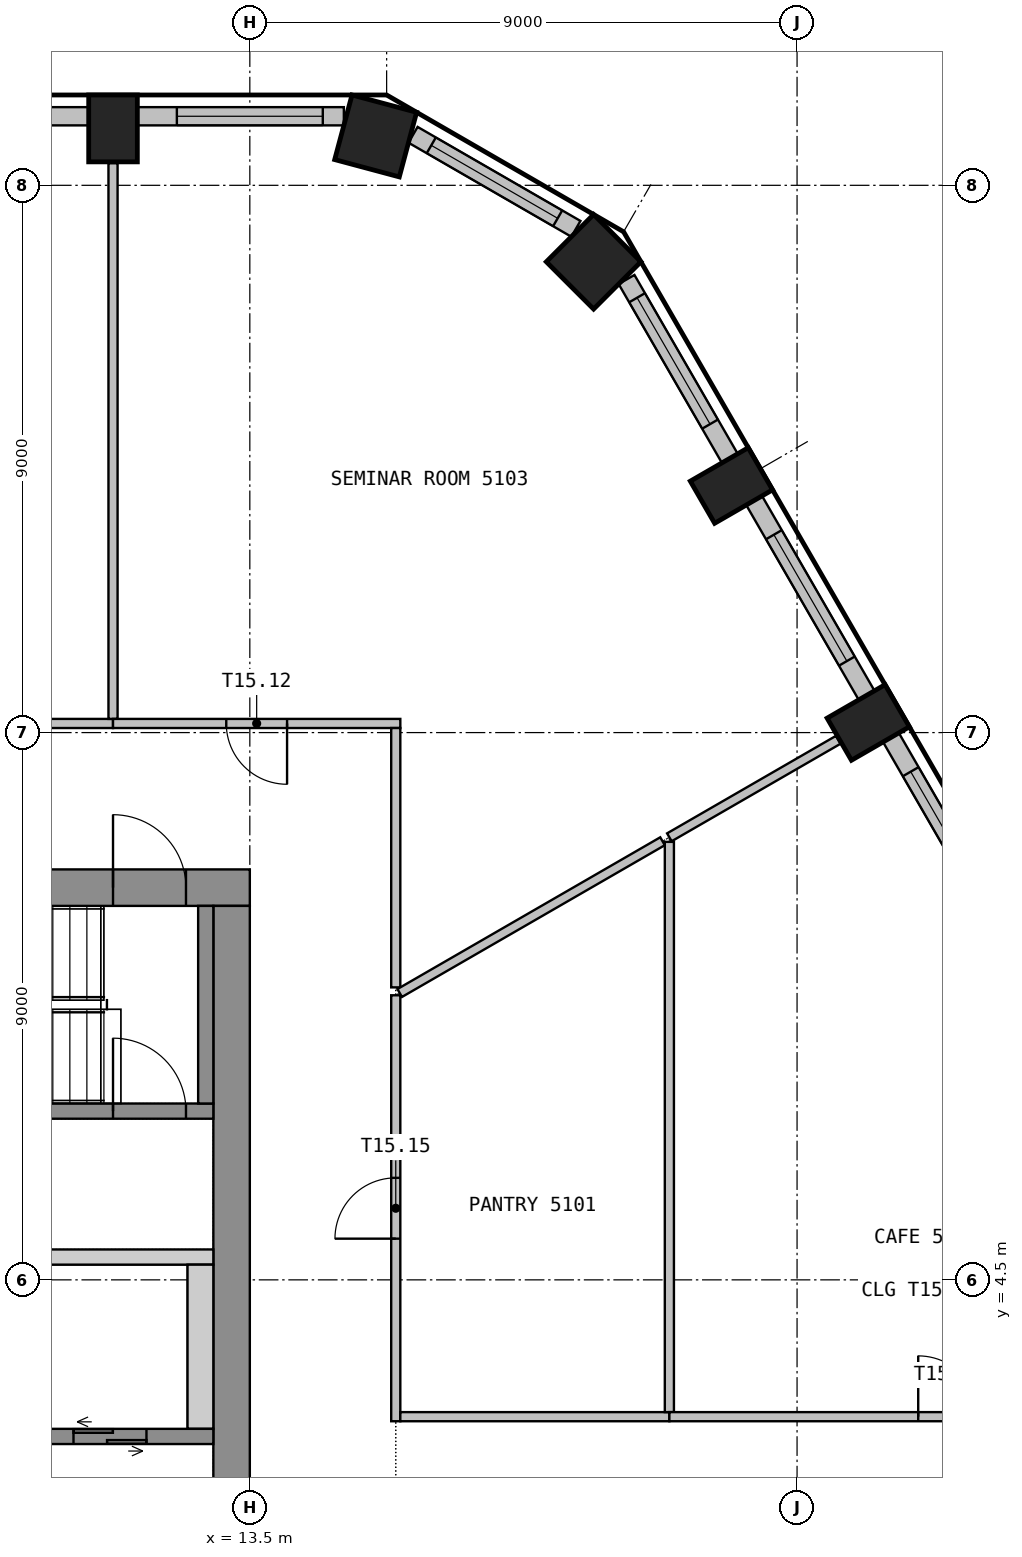
"""IFC4 building model, lengths in metres.
Left out: names, types, materials, properties, quantities, classifications, styles, units other than length and angle.
Written with IfcOpenShell. Run it as: python <this file> out.ifc"""

import sys

from ifc_helpers import new_model, si_unit, direction, frame, frame_2d, origin, origin_2d, place, context, subcontext, project, spatial, polyline, rectangle, outline, extrude, element, fill, save


model = new_model("IFC4")
c1 = context("Model", 3, precision=1e-05, world=origin(), true_north=direction((0.0, 1.0)))
c2 = subcontext(c1, "Body", "Model", "MODEL_VIEW")
j1 = project(units=[si_unit("LENGTHUNIT", "METRE"), si_unit("PLANEANGLEUNIT", "RADIAN")], contexts=[c1])
p1 = place(None, origin())
s1 = spatial("IfcSite", under=j1, at=p1, CompositionType="ELEMENT")
p2 = place(p1, origin())
s2 = spatial("IfcBuilding", under=s1, at=p2, CompositionType="ELEMENT")
p3 = place(p2, frame((0.0, 0.0, 207.3)))
s3 = spatial("IfcBuildingStorey", under=s2, at=p3, CompositionType="ELEMENT", Elevation=207.3)
for number, where, z_axis, x_axis in (
    (1, (23.671, 13.666, 0.0), (0.0, 0.0, 1.0), (-0.5, 0.866, 0.0)),
    (2, (21.421, 17.563, 0.0), (0.0, 0.0, 1.0), (-0.5, 0.866, 0.0)),
):
    element("IfcColumn", number, at=place(p3, frame(where, z_axis=z_axis, x_axis=x_axis)), inside=s3, PredefinedType="COLUMN", context=c2, shape_type="SweptSolid", body=[
        extrude(rectangle(XDim=0.8, YDim=1.1, at=origin_2d()), origin(), (0.0, 0.0, 1.0), 3.55),
    ])
for number, where, z_axis, x_axis in (
    (3, (19.154, 21.242, 0.0), (0.0, 0.0, 1.0), (-0.707, 0.707, 0.0)),
    (4, (15.57, 23.312, 0.0), (0.0, 0.0, 1.0), (-0.966, 0.259, 0.0)),
):
    element("IfcColumn", number, at=place(p3, frame(where, z_axis=z_axis, x_axis=x_axis)), inside=s3, PredefinedType="COLUMN", context=c2, shape_type="SweptSolid", body=[
        extrude(rectangle(XDim=1.1, YDim=1.1, at=origin_2d()), origin(), (0.0, 0.0, 1.0), 3.55),
    ])
p4 = place(p3, frame((11.25, 23.436, 0.0), z_axis=(0.0, 0.0, 1.0), x_axis=(-1.0, 0.0, 0.0)))
e5 = element("IfcColumn", 5, at=p4, inside=s3, PredefinedType="COLUMN", context=c2, shape_type="SweptSolid", body=[
    extrude(rectangle(XDim=0.8, YDim=1.1, at=origin_2d()), origin(), (0.0, 0.0, 1.0), 3.55),
])
p5 = place(p3, frame((25.894, 10.216, 0.0), z_axis=(0.0, 0.0, 1.0), x_axis=(-0.500029062817, 0.866008623709, 0.0)))
e6 = element("IfcWall", 6, at=p5, inside=s3, PredefinedType="SOLIDWALL", context=c2, shape_type="SweptSolid", body=[
    extrude(rectangle(XDim=3.699, YDim=0.3, at=frame_2d((1.85, 0.0))), origin(), (0.0, 0.0, 1.0), 3.55),
])
p6 = place(p5, frame((0.649, 0.0, 0.9)))
e7 = element("IfcOpeningElement", 7, at=p6, cuts=e6, PredefinedType="OPENING", context=c2, shape_type="SweptSolid", body=[
    extrude(rectangle(XDim=2.4, YDim=2.1, at=frame_2d((1.2, 1.05))), frame((0.0, 0.16, 0.0), z_axis=(0.0, -1.0, 0.0), x_axis=(1.0, 0.0, 0.0)), (0.0, 0.0, 1.0), 0.32),
])
p7 = place(p3, frame((23.644, 14.113, 0.0), z_axis=(0.0, 0.0, 1.0), x_axis=(-0.500029062817, 0.866008623709, 0.0)))
e8 = element("IfcWall", 8, at=p7, inside=s3, PredefinedType="SOLIDWALL", context=c2, shape_type="SweptSolid", body=[
    extrude(rectangle(XDim=3.699, YDim=0.3, at=frame_2d((1.85, 0.0))), origin(), (0.0, 0.0, 1.0), 3.55),
])
p8 = place(p7, frame((0.649, 0.0, 0.9)))
e9 = element("IfcOpeningElement", 9, at=p8, cuts=e8, PredefinedType="OPENING", context=c2, shape_type="SweptSolid", body=[
    extrude(rectangle(XDim=2.4, YDim=2.1, at=frame_2d((1.2, 1.05))), frame((0.0, 0.16, 0.0), z_axis=(0.0, -1.0, 0.0), x_axis=(1.0, 0.0, 0.0)), (0.0, 0.0, 1.0), 0.32),
])
p9 = place(p3, frame((21.394, 18.01, 0.0), z_axis=(0.0, 0.0, 1.0), x_axis=(-0.500012868213, 0.866017974191, 0.0)))
e10 = element("IfcWall", 10, at=p9, inside=s3, PredefinedType="SOLIDWALL", context=c2, shape_type="SweptSolid", body=[
    extrude(rectangle(XDim=3.396, YDim=0.3, at=frame_2d((1.698, 0.0))), origin(), (0.0, 0.0, 1.0), 3.55),
])
p10 = place(p9, frame((0.649, 0.0, 0.9)))
e11 = element("IfcOpeningElement", 11, at=p10, cuts=e10, PredefinedType="OPENING", context=c2, shape_type="SweptSolid", body=[
    extrude(rectangle(XDim=2.4, YDim=2.1, at=frame_2d((1.2, 1.05))), frame((0.0, 0.16, 0.0), z_axis=(0.0, -1.0, 0.0), x_axis=(1.0, 0.0, 0.0)), (0.0, 0.0, 1.0), 0.32),
])
p11 = place(p3, frame((18.863, 21.784, 0.0), z_axis=(0.0, 0.0, 1.0), x_axis=(-0.865994975416, 0.500052699777, 0.0)))
e12 = element("IfcWall", 12, at=p11, inside=s3, PredefinedType="SOLIDWALL", context=c2, shape_type="SweptSolid", body=[
    extrude(rectangle(XDim=3.093, YDim=0.3, at=frame_2d((1.546, 0.0))), origin(), (0.0, 0.0, 1.0), 3.55),
])
p12 = place(p11, frame((0.346, 0.0, 0.9)))
e13 = element("IfcOpeningElement", 13, at=p12, cuts=e12, PredefinedType="OPENING", context=c2, shape_type="SweptSolid", body=[
    extrude(rectangle(XDim=2.4, YDim=2.1, at=frame_2d((1.2, 1.05))), frame((0.0, 0.16, 0.0), z_axis=(0.0, -1.0, 0.0), x_axis=(1.0, 0.0, 0.0)), (0.0, 0.0, 1.0), 0.32),
])
p13 = place(p3, frame((15.046, 23.635, 0.0), z_axis=(0.0, 0.0, 1.0), x_axis=(-1.0, 0.0, 0.0)))
e14 = element("IfcWall", 14, at=p13, inside=s3, PredefinedType="SOLIDWALL", context=c2, shape_type="SweptSolid", body=[
    extrude(rectangle(XDim=3.396, YDim=0.3, at=frame_2d((1.698, 0.0))), origin(), (0.0, 0.0, 1.0), 3.55),
])
p14 = place(p13, frame((0.346, 0.0, 0.9)))
e15 = element("IfcOpeningElement", 15, at=p14, cuts=e14, PredefinedType="OPENING", context=c2, shape_type="SweptSolid", body=[
    extrude(rectangle(XDim=2.4, YDim=2.1, at=frame_2d((1.2, 1.05))), frame((0.0, 0.16, 0.0), z_axis=(0.0, -1.0, 0.0), x_axis=(1.0, 0.0, 0.0)), (0.0, 0.0, 1.0), 0.32),
])
p15 = place(p3, frame((10.85, 23.635, 0.0), z_axis=(0.0, 0.0, 1.0), x_axis=(-1.0, 0.0, 0.0)))
e16 = element("IfcWall", 16, at=p15, inside=s3, PredefinedType="SOLIDWALL", context=c2, shape_type="SweptSolid", body=[
    extrude(rectangle(XDim=3.699, YDim=0.3, at=frame_2d((1.85, 0.0))), origin(), (0.0, 0.0, 1.0), 3.55),
])
p16 = place(p15, frame((0.649, 0.0, 0.9)))
e17 = element("IfcOpeningElement", 17, at=p16, cuts=e16, PredefinedType="OPENING", context=c2, shape_type="SweptSolid", body=[
    extrude(rectangle(XDim=2.4, YDim=2.1, at=frame_2d((1.2, 1.05))), frame((0.0, 0.16, 0.0), z_axis=(0.0, -1.0, 0.0), x_axis=(1.0, 0.0, 0.0)), (0.0, 0.0, 1.0), 0.32),
])
p17 = place(p3, frame((-13.5, 10.95, 0.0), z_axis=(0.0, 0.0, 1.0), x_axis=(1.0, 0.0, 0.0)))
e18 = element("IfcWall", 18, at=p17, inside=s3, PredefinedType="SHEAR", context=c2, shape_type="SweptSolid", body=[
    extrude(rectangle(XDim=27.0, YDim=0.6, at=frame_2d((13.5, 0.0))), origin(), (0.0, 0.0, 1.0), 3.55),
])
p18 = place(p17, frame((12.3, 0.0, 0.0)))
e19 = element("IfcOpeningElement", 19, at=p18, cuts=e18, PredefinedType="OPENING", context=c2, shape_type="SweptSolid", body=[
    extrude(rectangle(XDim=2.4, YDim=2.1, at=frame_2d((1.2, 1.05))), frame((0.0, 0.31, 0.0), z_axis=(0.0, -1.0, 0.0), x_axis=(1.0, 0.0, 0.0)), (0.0, 0.0, 1.0), 0.62),
])
p19 = place(p17, frame((1.05, 0.0, 0.0)))
e20 = element("IfcOpeningElement", 20, at=p19, cuts=e18, PredefinedType="OPENING", context=c2, shape_type="SweptSolid", body=[
    extrude(rectangle(XDim=1.2, YDim=2.1, at=frame_2d((0.6, 1.05))), frame((0.0, 0.31, 0.0), z_axis=(0.0, -1.0, 0.0), x_axis=(1.0, 0.0, 0.0)), (0.0, 0.0, 1.0), 0.62),
])
p20 = place(p17, frame((24.75, 0.0, 0.0)))
e21 = element("IfcOpeningElement", 21, at=p20, cuts=e18, PredefinedType="OPENING", context=c2, shape_type="SweptSolid", body=[
    extrude(rectangle(XDim=1.2, YDim=2.1, at=frame_2d((0.6, 1.05))), frame((0.0, 0.31, 0.0), z_axis=(0.0, -1.0, 0.0), x_axis=(1.0, 0.0, 0.0)), (0.0, 0.0, 1.0), 0.62),
])
p21 = place(p3, frame((13.2, -10.65, 0.0), z_axis=(0.0, 0.0, 1.0), x_axis=(0.0, 1.0, 0.0)))
e22 = element("IfcWall", 22, at=p21, inside=s3, PredefinedType="SHEAR", context=c2, shape_type="SweptSolid", body=[
    extrude(rectangle(XDim=21.3, YDim=0.6, at=frame_2d((10.65, 0.0))), origin(), (0.0, 0.0, 1.0), 3.55),
])
p22 = place(p21, frame((9.45, 0.0, 0.0)))
e23 = element("IfcOpeningElement", 23, at=p22, cuts=e22, PredefinedType="OPENING", context=c2, shape_type="SweptSolid", body=[
    extrude(rectangle(XDim=2.4, YDim=2.1, at=frame_2d((1.2, 1.05))), frame((0.0, 0.31, 0.0), z_axis=(0.0, -1.0, 0.0), x_axis=(1.0, 0.0, 0.0)), (0.0, 0.0, 1.0), 0.62),
])
p23 = place(p3, origin())
e24 = element("IfcWall", 24, at=p23, inside=s3, PredefinedType="SHEAR", context=c2, shape_type="SweptSolid", body=[
    extrude(outline(polyline([(4.075, 4.75), (12.9, 4.75), (12.9, 5.0), (4.075, 5.0), (4.075, 4.75)])), origin(), (0.0, 0.0, 1.0), 3.55),
])
p24 = place(p3, origin())
e25 = element("IfcWall", 25, at=p24, inside=s3, PredefinedType="SHEAR", context=c2, shape_type="SweptSolid", body=[
    extrude(outline(polyline([(12.475, 2.05), (12.9, 2.05), (12.9, 4.75), (12.475, 4.75), (12.475, 2.05)])), origin(), (0.0, 0.0, 1.0), 3.55),
])
p25 = place(p3, frame((9.675, 1.925, 0.0), z_axis=(0.0, 0.0, 1.0), x_axis=(1.0, 0.0, 0.0)))
e26 = element("IfcWall", 26, at=p25, inside=s3, PredefinedType="SHEAR", context=c2, shape_type="SweptSolid", body=[
    extrude(rectangle(XDim=3.225, YDim=0.25, at=frame_2d((1.612, 0.0))), origin(), (0.0, 0.0, 1.0), 3.55),
])
p26 = place(p25, frame((0.925, 0.0, 0.0)))
e27 = element("IfcOpeningElement", 27, at=p26, cuts=e26, PredefinedType="OPENING", context=c2, shape_type="SweptSolid", body=[
    extrude(rectangle(XDim=1.2, YDim=2.1, at=frame_2d((0.6, 1.05))), frame((0.0, 0.135, 0.0), z_axis=(0.0, -1.0, 0.0), x_axis=(1.0, 0.0, 0.0)), (0.0, 0.0, 1.0), 0.27),
])
p27 = place(p3, frame((2.8, 7.275, 0.0), z_axis=(0.0, 0.0, 1.0), x_axis=(1.0, 0.0, 0.0)))
e28 = element("IfcWall", 28, at=p27, inside=s3, PredefinedType="SHEAR", context=c2, shape_type="SweptSolid", body=[
    extrude(rectangle(XDim=10.1, YDim=0.25, at=frame_2d((5.05, 0.0))), origin(), (0.0, 0.0, 1.0), 3.55),
])
p28 = place(p27, frame((8.45, 0.0, 0.0)))
e29 = element("IfcOpeningElement", 29, at=p28, cuts=e28, PredefinedType="OPENING", context=c2, shape_type="SweptSolid", body=[
    extrude(rectangle(XDim=1.2, YDim=2.1, at=frame_2d((0.6, 1.05))), frame((0.0, 0.135, 0.0), z_axis=(0.0, -1.0, 0.0), x_axis=(1.0, 0.0, 0.0)), (0.0, 0.0, 1.0), 0.27),
])
p29 = place(p3, frame((12.775, 7.4, 0.0), z_axis=(0.0, 0.0, 1.0), x_axis=(0.0, 1.0, 0.0)))
e30 = element("IfcWall", 30, at=p29, inside=s3, PredefinedType="SHEAR", context=c2, shape_type="SweptSolid", body=[
    extrude(rectangle(XDim=3.25, YDim=0.25, at=frame_2d((1.625, 0.0))), origin(), (0.0, 0.0, 1.0), 3.55),
])
p30 = place(p3, frame((11.25, 13.65, 0.0), z_axis=(0.0, 0.0, 1.0), x_axis=(-1.0, 0.0, 0.0)))
e31 = element("IfcWall", 31, at=p30, inside=s3, PredefinedType="PARTITIONING", context=c2, shape_type="SweptSolid", body=[
    extrude(rectangle(XDim=13.5, YDim=0.15, at=frame_2d((6.75, 0.0))), origin(), (0.0, 0.0, 1.0), 3.55),
])
p31 = place(p30, frame((6.25, 0.0, 0.0)))
e32 = element("IfcOpeningElement", 32, at=p31, cuts=e31, PredefinedType="OPENING", context=c2, shape_type="SweptSolid", body=[
    extrude(rectangle(XDim=1.0, YDim=2.1, at=frame_2d((0.5, 1.05))), frame((0.0, 0.085, 0.0), z_axis=(0.0, -1.0, 0.0), x_axis=(1.0, 0.0, 0.0)), (0.0, 0.0, 1.0), 0.17),
])
p32 = place(p3, frame((11.25, 22.865, 0.0), z_axis=(0.0, 0.0, 1.0), x_axis=(0.0, -1.0, 0.0)))
e33 = element("IfcWall", 33, at=p32, inside=s3, PredefinedType="PARTITIONING", context=c2, shape_type="SweptSolid", body=[
    extrude(rectangle(XDim=9.14, YDim=0.15, at=frame_2d((4.57, 0.0))), origin(), (0.0, 0.0, 1.0), 3.55),
])
p33 = place(p3, frame((15.975, 13.65, 0.0), z_axis=(0.0, 0.0, 1.0), x_axis=(-1.0, 0.0, 0.0)))
e34 = element("IfcWall", 34, at=p33, inside=s3, PredefinedType="PARTITIONING", context=c2, shape_type="SweptSolid", body=[
    extrude(rectangle(XDim=4.725, YDim=0.15, at=frame_2d((2.363, 0.0))), origin(), (0.0, 0.0, 1.0), 3.55),
])
p34 = place(p33, frame((1.863, 0.0, 0.0)))
e35 = element("IfcOpeningElement", 35, at=p34, cuts=e34, PredefinedType="OPENING", context=c2, shape_type="SweptSolid", body=[
    extrude(rectangle(XDim=1.0, YDim=2.1, at=frame_2d((0.5, 1.05))), frame((0.0, 0.085, 0.0), z_axis=(0.0, -1.0, 0.0), x_axis=(1.0, 0.0, 0.0)), (0.0, 0.0, 1.0), 0.17),
])
p35 = place(p3, frame((15.9, 2.175, 0.0), z_axis=(0.0, 0.0, 1.0), x_axis=(0.0, 1.0, 0.0)))
e36 = element("IfcWall", 36, at=p35, inside=s3, PredefinedType="PARTITIONING", context=c2, shape_type="SweptSolid", body=[
    extrude(rectangle(XDim=7.005, YDim=0.15, at=frame_2d((3.502, 0.0))), origin(), (0.0, 0.0, 1.0), 3.55),
])
p36 = place(p35, frame((3.002, 0.0, 0.0)))
e37 = element("IfcOpeningElement", 37, at=p36, cuts=e36, PredefinedType="OPENING", context=c2, shape_type="SweptSolid", body=[
    extrude(rectangle(XDim=1.0, YDim=2.1, at=frame_2d((0.5, 1.05))), frame((0.0, 0.085, 0.0), z_axis=(0.0, -1.0, 0.0), x_axis=(1.0, 0.0, 0.0)), (0.0, 0.0, 1.0), 0.17),
])
p37 = place(p3, frame((15.975, 2.25, 0.0), z_axis=(0.0, 0.0, 1.0), x_axis=(1.0, 0.0, 0.0)))
e38 = element("IfcWall", 38, at=p37, inside=s3, PredefinedType="PARTITIONING", context=c2, shape_type="SweptSolid", body=[
    extrude(rectangle(XDim=4.425, YDim=0.15, at=frame_2d((2.212, 0.0))), origin(), (0.0, 0.0, 1.0), 3.55),
])
p38 = place(p3, frame((15.9, 9.31, 0.0), z_axis=(0.0, 0.0, 1.0), x_axis=(0.0, 1.0, 0.0)))
e39 = element("IfcWall", 39, at=p38, inside=s3, PredefinedType="PARTITIONING", context=c2, shape_type="SweptSolid", body=[
    extrude(rectangle(XDim=4.265, YDim=0.15, at=frame_2d((2.132, 0.0))), origin(), (0.0, 0.0, 1.0), 3.55),
])
p39 = place(p3, frame((20.287, 11.713, 0.0), z_axis=(0.0, 0.0, 1.0), x_axis=(-0.866034070548, -0.499984988425, 0.0)))
e40 = element("IfcWall", 40, at=p39, inside=s3, PredefinedType="PARTITIONING", context=c2, shape_type="SweptSolid", body=[
    extrude(rectangle(XDim=4.991, YDim=0.15, at=frame_2d((2.496, 0.0))), origin(), (0.0, 0.0, 1.0), 3.55),
])
p40 = place(p3, frame((20.4, 11.703, 0.0), z_axis=(0.0, 0.0, 1.0), x_axis=(0.0, -1.0, 0.0)))
e41 = element("IfcWall", 41, at=p40, inside=s3, PredefinedType="PARTITIONING", context=c2, shape_type="SweptSolid", body=[
    extrude(rectangle(XDim=9.378, YDim=0.15, at=frame_2d((4.689, 0.0))), origin(), (0.0, 0.0, 1.0), 3.55),
])
p41 = place(p3, frame((20.4, 2.25, 0.0), z_axis=(0.0, 0.0, 1.0), x_axis=(1.0, 0.0, 0.0)))
e42 = element("IfcWall", 42, at=p41, inside=s3, PredefinedType="PARTITIONING", context=c2, shape_type="SweptSolid", body=[
    extrude(rectangle(XDim=9.185, YDim=0.15, at=frame_2d((4.593, 0.0))), origin(), (0.0, 0.0, 1.0), 3.55),
])
p42 = place(p41, frame((4.093, 0.0, 0.0)))
e43 = element("IfcOpeningElement", 43, at=p42, cuts=e42, PredefinedType="OPENING", context=c2, shape_type="SweptSolid", body=[
    extrude(rectangle(XDim=1.0, YDim=2.1, at=frame_2d((0.5, 1.05))), frame((0.0, 0.085, 0.0), z_axis=(0.0, -1.0, 0.0), x_axis=(1.0, 0.0, 0.0)), (0.0, 0.0, 1.0), 0.17),
])
p43 = place(p3, frame((23.177, 13.381, 0.0), z_axis=(0.0, 0.0, 1.0), x_axis=(-0.866089241828, -0.499889412961, 0.0)))
e44 = element("IfcWall", 44, at=p43, inside=s3, PredefinedType="PARTITIONING", context=c2, shape_type="SweptSolid", body=[
    extrude(rectangle(XDim=3.207, YDim=0.15, at=frame_2d((1.604, 0.0))), origin(), (0.0, 0.0, 1.0), 3.55),
])
p44 = place(p6, origin())
e45 = element("IfcWindow", 45, at=p44, inside=s3, PartitioningType="SINGLE_PANEL", PredefinedType="WINDOW", context=c2, shape_type="SweptSolid", body=[
    extrude(rectangle(XDim=2.4, YDim=2.1, at=frame_2d((1.2, 1.05))), frame((0.0, 0.03, 0.0), z_axis=(0.0, -1.0, 0.0), x_axis=(1.0, 0.0, 0.0)), (0.0, 0.0, 1.0), 0.06),
])
fill(e7, e45)
p45 = place(p8, origin())
e46 = element("IfcWindow", 46, at=p45, inside=s3, PartitioningType="SINGLE_PANEL", PredefinedType="WINDOW", context=c2, shape_type="SweptSolid", body=[
    extrude(rectangle(XDim=2.4, YDim=2.1, at=frame_2d((1.2, 1.05))), frame((0.0, 0.03, 0.0), z_axis=(0.0, -1.0, 0.0), x_axis=(1.0, 0.0, 0.0)), (0.0, 0.0, 1.0), 0.06),
])
fill(e9, e46)
p46 = place(p10, origin())
e47 = element("IfcWindow", 47, at=p46, inside=s3, PartitioningType="SINGLE_PANEL", PredefinedType="WINDOW", context=c2, shape_type="SweptSolid", body=[
    extrude(rectangle(XDim=2.4, YDim=2.1, at=frame_2d((1.2, 1.05))), frame((0.0, 0.03, 0.0), z_axis=(0.0, -1.0, 0.0), x_axis=(1.0, 0.0, 0.0)), (0.0, 0.0, 1.0), 0.06),
])
fill(e11, e47)
p47 = place(p12, origin())
e48 = element("IfcWindow", 48, at=p47, inside=s3, PartitioningType="SINGLE_PANEL", PredefinedType="WINDOW", context=c2, shape_type="SweptSolid", body=[
    extrude(rectangle(XDim=2.4, YDim=2.1, at=frame_2d((1.2, 1.05))), frame((0.0, 0.03, 0.0), z_axis=(0.0, -1.0, 0.0), x_axis=(1.0, 0.0, 0.0)), (0.0, 0.0, 1.0), 0.06),
])
fill(e13, e48)
p48 = place(p14, origin())
e49 = element("IfcWindow", 49, at=p48, inside=s3, PartitioningType="SINGLE_PANEL", PredefinedType="WINDOW", context=c2, shape_type="SweptSolid", body=[
    extrude(rectangle(XDim=2.4, YDim=2.1, at=frame_2d((1.2, 1.05))), frame((0.0, 0.03, 0.0), z_axis=(0.0, -1.0, 0.0), x_axis=(1.0, 0.0, 0.0)), (0.0, 0.0, 1.0), 0.06),
])
fill(e15, e49)
p49 = place(p20, origin())
e50 = element("IfcDoor", 50, at=p49, inside=s3, OperationType="SINGLE_SWING_RIGHT", PredefinedType="DOOR", context=c2, shape_type="SweptSolid", body=[
    extrude(rectangle(XDim=1.2, YDim=2.1, at=frame_2d((0.6, 1.05))), frame((0.0, 0.025, 0.0), z_axis=(0.0, -1.0, 0.0), x_axis=(1.0, 0.0, 0.0)), (0.0, 0.0, 1.0), 0.05),
])
fill(e21, e50)
p50 = place(p26, origin())
e51 = element("IfcDoor", 51, at=p50, inside=s3, OperationType="DOUBLE_DOOR_SLIDING", PredefinedType="DOOR", context=c2, shape_type="SweptSolid", body=[
    extrude(rectangle(XDim=1.2, YDim=2.1, at=frame_2d((0.6, 1.05))), frame((0.0, 0.025, 0.0), z_axis=(0.0, -1.0, 0.0), x_axis=(1.0, 0.0, 0.0)), (0.0, 0.0, 1.0), 0.05),
])
fill(e27, e51)
p51 = place(p28, origin())
e52 = element("IfcDoor", 52, at=p51, inside=s3, OperationType="SINGLE_SWING_LEFT", PredefinedType="DOOR", context=c2, shape_type="SweptSolid", body=[
    extrude(rectangle(XDim=1.2, YDim=2.1, at=frame_2d((0.6, 1.05))), frame((0.0, 0.025, 0.0), z_axis=(0.0, -1.0, 0.0), x_axis=(1.0, 0.0, 0.0)), (0.0, 0.0, 1.0), 0.05),
])
fill(e29, e52)
p52 = place(p34, origin())
e53 = element("IfcDoor", 53, at=p52, inside=s3, OperationType="SINGLE_SWING_LEFT", PredefinedType="DOOR", context=c2, shape_type="SweptSolid", body=[
    extrude(rectangle(XDim=1.0, YDim=2.1, at=frame_2d((0.5, 1.05))), frame((0.0, 0.025, 0.0), z_axis=(0.0, -1.0, 0.0), x_axis=(1.0, 0.0, 0.0)), (0.0, 0.0, 1.0), 0.05),
])
fill(e35, e53)
p53 = place(p36, origin())
e54 = element("IfcDoor", 54, at=p53, inside=s3, OperationType="SINGLE_SWING_LEFT", PredefinedType="DOOR", context=c2, shape_type="SweptSolid", body=[
    extrude(rectangle(XDim=1.0, YDim=2.1, at=frame_2d((0.5, 1.05))), frame((0.0, 0.025, 0.0), z_axis=(0.0, -1.0, 0.0), x_axis=(1.0, 0.0, 0.0)), (0.0, 0.0, 1.0), 0.05),
])
fill(e37, e54)
p54 = place(p42, origin())
e55 = element("IfcDoor", 55, at=p54, inside=s3, OperationType="SINGLE_SWING_LEFT", PredefinedType="DOOR", context=c2, shape_type="SweptSolid", body=[
    extrude(rectangle(XDim=1.0, YDim=2.1, at=frame_2d((0.5, 1.05))), frame((0.0, 0.025, 0.0), z_axis=(0.0, -1.0, 0.0), x_axis=(1.0, 0.0, 0.0)), (0.0, 0.0, 1.0), 0.05),
])
fill(e43, e55)
save(model, sys.argv[1])
